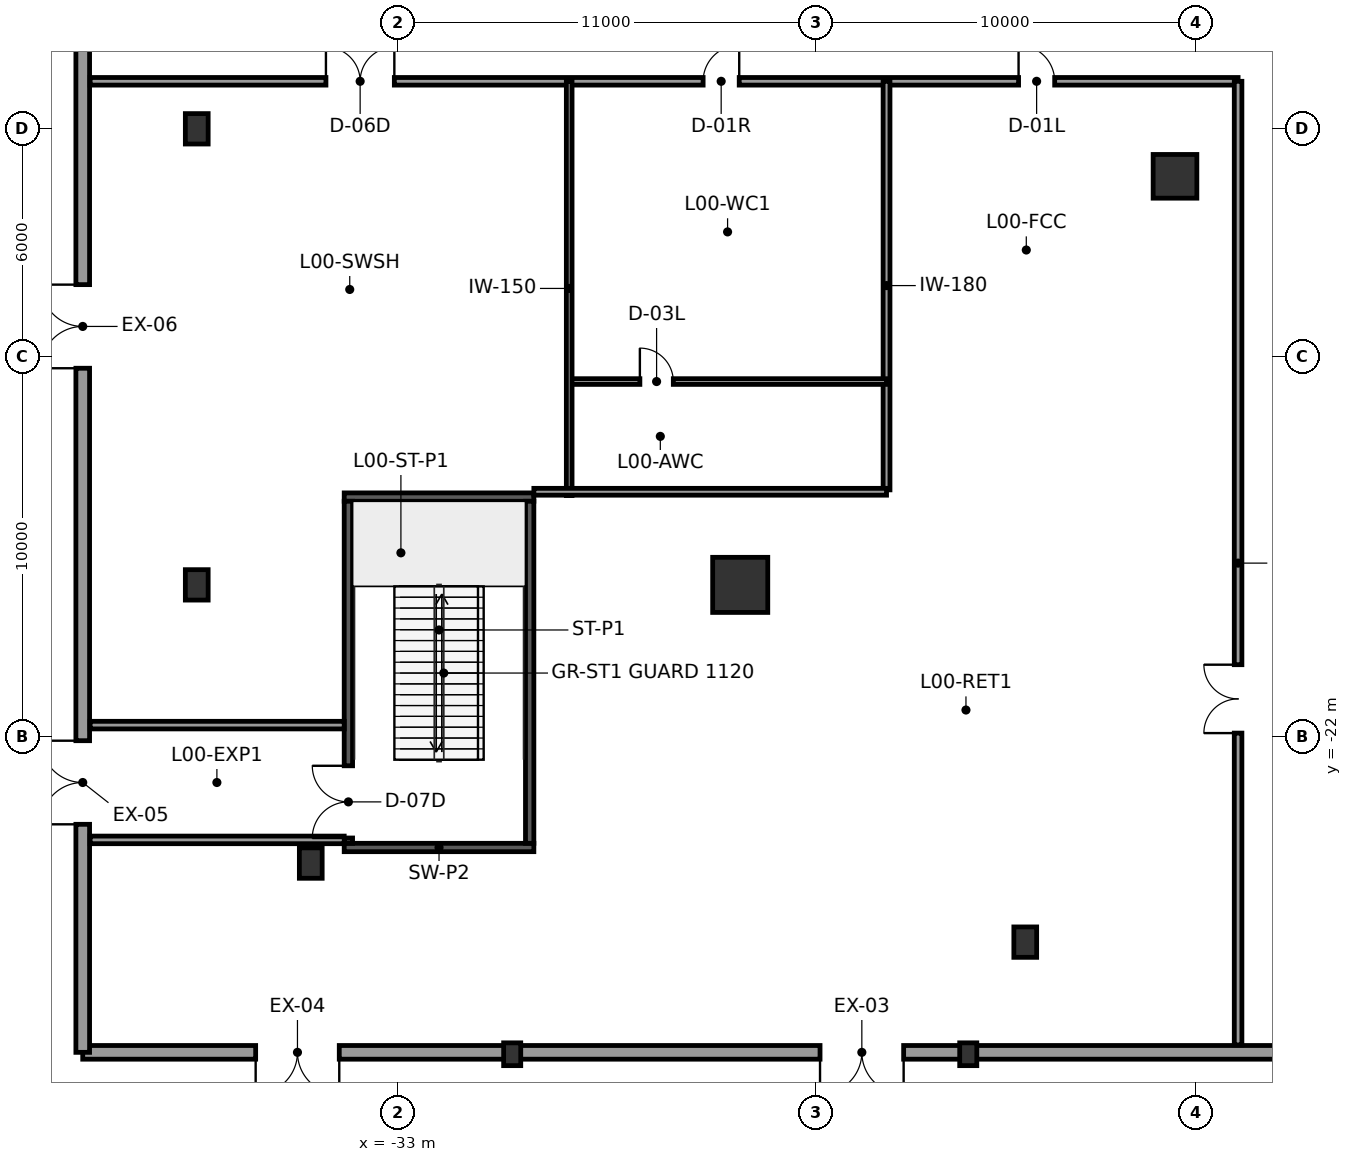
"""IFC4 building model, lengths in metres.
Left out: names, types, materials, properties, quantities, classifications, styles, units other than length and angle.
Written with IfcOpenShell. Run it as: python <this file> out.ifc"""

import sys

from ifc_helpers import new_model, si_unit, direction, frame, frame_2d, origin, origin_2d, place, context, subcontext, project, spatial, rectangle, hollow_rectangle, extrude, element, fill, save


model = new_model("IFC4")
c1 = context("Model", 3, precision=1e-05, world=origin(), true_north=direction((0.0, 1.0)))
c2 = subcontext(c1, "Body", "Model", "MODEL_VIEW")
j1 = project(units=[si_unit("LENGTHUNIT", "METRE"), si_unit("PLANEANGLEUNIT", "RADIAN")], contexts=[c1])
p1 = place(None, origin())
s1 = spatial("IfcSite", under=j1, at=p1, CompositionType="ELEMENT")
p2 = place(p1, origin())
s2 = spatial("IfcBuilding", under=s1, at=p2, CompositionType="ELEMENT")
p3 = place(p2, origin())
s3 = spatial("IfcBuildingStorey", under=s2, at=p3, CompositionType="ELEMENT", Elevation=0.0)
p4 = place(p3, frame((-12.56, -7.25, 0.0), z_axis=(0.0, 0.0, 1.0), x_axis=(1.0, 0.0, 0.0)))
e1 = element("IfcColumn", 1, at=p4, inside=s3, PredefinedType="COLUMN", context=c2, shape_type="SweptSolid", body=[
    extrude(rectangle(XDim=1.15, YDim=1.15, at=origin_2d()), origin(), (0.0, 0.0, 1.0), 6.0),
])
p5 = place(p3, frame((-24.0, -18.0, 0.0), z_axis=(0.0, 0.0, 1.0), x_axis=(1.0, 0.0, 0.0)))
e2 = element("IfcColumn", 2, at=p5, inside=s3, PredefinedType="COLUMN", context=c2, shape_type="SweptSolid", body=[
    extrude(rectangle(XDim=1.45, YDim=1.45, at=origin_2d()), origin(), (0.0, 0.0, 1.0), 6.0),
])
for number, where, z_axis, x_axis in (
    (3, (-38.3, -18.0, 0.0), (0.0, 0.0, 1.0), (1.0, 0.0, 0.0)),
    (4, (-38.3, -6.0, 0.0), (0.0, 0.0, 1.0), (1.0, 0.0, 0.0)),
    (5, (-16.5, -27.4, 0.0), (0.0, 0.0, 1.0), (1.0, 0.0, 0.0)),
    (6, (-35.3, -25.32, 0.0), (0.0, 0.0, 1.0), (1.0, 0.0, 0.0)),
):
    element("IfcColumn", number, at=place(p3, frame(where, z_axis=z_axis, x_axis=x_axis)), inside=s3, PredefinedType="COLUMN", context=c2, shape_type="SweptSolid", body=[
        extrude(hollow_rectangle(XDim=0.6, YDim=0.8, WallThickness=0.05, at=origin_2d()), origin(), (0.0, 0.0, 1.0), 6.0),
    ])
for number, where, z_axis, x_axis in (
    (7, (-30.0, -30.35, -0.3), (0.0, 0.0, 1.0), (1.0, 0.0, 0.0)),
    (8, (-18.0, -30.35, -0.3), (0.0, 0.0, 1.0), (1.0, 0.0, 0.0)),
):
    element("IfcColumn", number, at=place(p3, frame(where, z_axis=z_axis, x_axis=x_axis)), inside=s3, PredefinedType="PILASTER", context=c2, shape_type="SweptSolid", body=[
        extrude(rectangle(XDim=0.45, YDim=0.6, at=origin_2d()), origin(), (0.0, 0.0, 1.0), 6.3),
    ])
p6 = place(p3, frame((41.3, -30.3, 0.0), z_axis=(0.0, 0.0, 1.0), x_axis=(-1.0, 0.0, 0.0)))
e9 = element("IfcWall", 9, at=p6, inside=s3, PredefinedType="STANDARD", context=c2, shape_type="SweptSolid", body=[
    extrude(rectangle(XDim=82.6, YDim=0.36, at=frame_2d((41.3, 0.0))), origin(), (0.0, 0.0, 1.0), 5.7),
])
p7 = place(p6, frame((2.65, 0.0, 0.0)))
e10 = element("IfcOpeningElement", 10, at=p7, cuts=e9, PredefinedType="OPENING", context=c2, shape_type="SweptSolid", body=[
    extrude(rectangle(XDim=6.0, YDim=4.5, at=frame_2d((3.0, 2.25))), frame((0.0, 0.19, 0.0), z_axis=(0.0, -1.0, 0.0), x_axis=(1.0, 0.0, 0.0)), (0.0, 0.0, 1.0), 0.38),
])
p8 = place(p6, frame((19.4, 0.0, 0.0)))
e11 = element("IfcOpeningElement", 11, at=p8, cuts=e9, PredefinedType="OPENING", context=c2, shape_type="SweptSolid", body=[
    extrude(rectangle(XDim=2.2, YDim=2.4, at=frame_2d((1.1, 1.2))), frame((0.0, 0.19, 0.0), z_axis=(0.0, -1.0, 0.0), x_axis=(1.0, 0.0, 0.0)), (0.0, 0.0, 1.0), 0.38),
])
p9 = place(p6, frame((43.4, 0.0, 0.0)))
e12 = element("IfcOpeningElement", 12, at=p9, cuts=e9, PredefinedType="OPENING", context=c2, shape_type="SweptSolid", body=[
    extrude(rectangle(XDim=2.2, YDim=2.4, at=frame_2d((1.1, 1.2))), frame((0.0, 0.19, 0.0), z_axis=(0.0, -1.0, 0.0), x_axis=(1.0, 0.0, 0.0)), (0.0, 0.0, 1.0), 0.38),
])
p10 = place(p6, frame((61.0, 0.0, 0.0)))
e13 = element("IfcOpeningElement", 13, at=p10, cuts=e9, PredefinedType="OPENING", context=c2, shape_type="SweptSolid", body=[
    extrude(rectangle(XDim=2.2, YDim=2.4, at=frame_2d((1.1, 1.2))), frame((0.0, 0.19, 0.0), z_axis=(0.0, -1.0, 0.0), x_axis=(1.0, 0.0, 0.0)), (0.0, 0.0, 1.0), 0.38),
])
p11 = place(p6, frame((75.85, 0.0, 0.0)))
e14 = element("IfcOpeningElement", 14, at=p11, cuts=e9, PredefinedType="OPENING", context=c2, shape_type="SweptSolid", body=[
    extrude(rectangle(XDim=2.2, YDim=2.4, at=frame_2d((1.1, 1.2))), frame((0.0, 0.19, 0.0), z_axis=(0.0, -1.0, 0.0), x_axis=(1.0, 0.0, 0.0)), (0.0, 0.0, 1.0), 0.38),
])
p12 = place(p3, frame((-41.3, -30.3, 0.0), z_axis=(0.0, 0.0, 1.0), x_axis=(0.0, 1.0, 0.0)))
e15 = element("IfcWall", 15, at=p12, inside=s3, PredefinedType="STANDARD", context=c2, shape_type="SweptSolid", body=[
    extrude(rectangle(XDim=60.6, YDim=0.36, at=frame_2d((30.3, 0.0))), origin(), (0.0, 0.0, 1.0), 5.7),
])
p13 = place(p12, frame((6.0, 0.0, 0.0)))
e16 = element("IfcOpeningElement", 16, at=p13, cuts=e15, PredefinedType="OPENING", context=c2, shape_type="SweptSolid", body=[
    extrude(rectangle(XDim=2.2, YDim=2.4, at=frame_2d((1.1, 1.2))), frame((0.0, 0.19, 0.0), z_axis=(0.0, -1.0, 0.0), x_axis=(1.0, 0.0, 0.0)), (0.0, 0.0, 1.0), 0.38),
])
p14 = place(p12, frame((18.0, 0.0, 0.0)))
e17 = element("IfcOpeningElement", 17, at=p14, cuts=e15, PredefinedType="OPENING", context=c2, shape_type="SweptSolid", body=[
    extrude(rectangle(XDim=2.2, YDim=2.4, at=frame_2d((1.1, 1.2))), frame((0.0, 0.19, 0.0), z_axis=(0.0, -1.0, 0.0), x_axis=(1.0, 0.0, 0.0)), (0.0, 0.0, 1.0), 0.38),
])
p15 = place(p12, frame((41.2, 0.0, 0.0)))
e18 = element("IfcOpeningElement", 18, at=p15, cuts=e15, PredefinedType="OPENING", context=c2, shape_type="SweptSolid", body=[
    extrude(rectangle(XDim=2.2, YDim=2.4, at=frame_2d((1.1, 1.2))), frame((0.0, 0.19, 0.0), z_axis=(0.0, -1.0, 0.0), x_axis=(1.0, 0.0, 0.0)), (0.0, 0.0, 1.0), 0.38),
])
p16 = place(p12, frame((52.4, 0.0, 0.0)))
e19 = element("IfcOpeningElement", 19, at=p16, cuts=e15, PredefinedType="OPENING", context=c2, shape_type="SweptSolid", body=[
    extrude(rectangle(XDim=2.2, YDim=2.4, at=frame_2d((1.1, 1.2))), frame((0.0, 0.19, 0.0), z_axis=(0.0, -1.0, 0.0), x_axis=(1.0, 0.0, 0.0)), (0.0, 0.0, 1.0), 0.38),
])
for number, where, z_axis, x_axis in (
    (20, (-34.42, -24.91, 0.0), (0.0, 0.0, 1.0), (1.0, 0.0, 0.0)),
    (21, (-34.42, -15.69, 0.0), (0.0, 0.0, 1.0), (1.0, 0.0, 0.0)),
):
    element("IfcWall", number, at=place(p3, frame(where, z_axis=z_axis, x_axis=x_axis)), inside=s3, PredefinedType="SHEAR", context=c2, shape_type="SweptSolid", body=[
        extrude(rectangle(XDim=4.99, YDim=0.22, at=frame_2d((2.495, 0.0))), origin(), (0.0, 0.0, 1.0), 5.7),
    ])
p17 = place(p3, frame((-34.31, -24.8, 0.0), z_axis=(0.0, 0.0, 1.0), x_axis=(0.0, 1.0, 0.0)))
e22 = element("IfcWall", 22, at=p17, inside=s3, PredefinedType="SHEAR", context=c2, shape_type="SweptSolid", body=[
    extrude(rectangle(XDim=9.0, YDim=0.22, at=frame_2d((4.5, 0.0))), origin(), (0.0, 0.0, 1.0), 5.7),
])
p18 = place(p17, frame((0.14, 0.0, 0.0)))
e23 = element("IfcOpeningElement", 23, at=p18, cuts=e22, PredefinedType="OPENING", context=c2, shape_type="SweptSolid", body=[
    extrude(rectangle(XDim=1.9, YDim=2.2, at=frame_2d((0.95, 1.1))), frame((0.0, 0.12, 0.0), z_axis=(0.0, -1.0, 0.0), x_axis=(1.0, 0.0, 0.0)), (0.0, 0.0, 1.0), 0.24),
])
p19 = place(p3, frame((-29.54, -15.8, 0.0), z_axis=(0.0, 0.0, 1.0), x_axis=(0.0, -1.0, 0.0)))
e24 = element("IfcWall", 24, at=p19, inside=s3, PredefinedType="SHEAR", context=c2, shape_type="SweptSolid", body=[
    extrude(rectangle(XDim=9.0, YDim=0.22, at=frame_2d((4.5, 0.0))), origin(), (0.0, 0.0, 1.0), 5.7),
])
p20 = place(p3, frame((-41.105, -4.75, 0.0), z_axis=(0.0, 0.0, 1.0), x_axis=(1.0, 0.0, 0.0)))
e25 = element("IfcWall", 25, at=p20, inside=s3, PredefinedType="PARTITIONING", context=c2, shape_type="SweptSolid", body=[
    extrude(rectangle(XDim=30.205, YDim=0.2, at=frame_2d((15.103, 0.0))), origin(), (0.0, 0.0, 1.0), 5.7),
])
p21 = place(p20, frame((24.429, 0.0, 0.0)))
e26 = element("IfcOpeningElement", 26, at=p21, cuts=e25, PredefinedType="OPENING", context=c2, shape_type="SweptSolid", body=[
    extrude(rectangle(XDim=0.95, YDim=2.15, at=frame_2d((0.475, 1.075))), frame((0.0, 0.11, 0.0), z_axis=(0.0, -1.0, 0.0), x_axis=(1.0, 0.0, 0.0)), (0.0, 0.0, 1.0), 0.22),
])
p22 = place(p20, frame((16.129, 0.0, 0.0)))
e27 = element("IfcOpeningElement", 27, at=p22, cuts=e25, PredefinedType="OPENING", context=c2, shape_type="SweptSolid", body=[
    extrude(rectangle(XDim=0.95, YDim=2.15, at=frame_2d((0.475, 1.075))), frame((0.0, 0.11, 0.0), z_axis=(0.0, -1.0, 0.0), x_axis=(1.0, 0.0, 0.0)), (0.0, 0.0, 1.0), 0.22),
])
p23 = place(p20, frame((6.204, 0.0, 0.0)))
e28 = element("IfcOpeningElement", 28, at=p23, cuts=e25, PredefinedType="OPENING", context=c2, shape_type="SweptSolid", body=[
    extrude(rectangle(XDim=1.8, YDim=2.2, at=frame_2d((0.9, 1.1))), frame((0.0, 0.11, 0.0), z_axis=(0.0, -1.0, 0.0), x_axis=(1.0, 0.0, 0.0)), (0.0, 0.0, 1.0), 0.22),
])
p24 = place(p3, frame((-10.9, -30.105, 0.0), z_axis=(0.0, 0.0, 1.0), x_axis=(0.0, 1.0, 0.0)))
e29 = element("IfcWall", 29, at=p24, inside=s3, PredefinedType="PARTITIONING", context=c2, shape_type="SweptSolid", body=[
    extrude(rectangle(XDim=25.355, YDim=0.2, at=frame_2d((12.677, 0.0))), origin(), (0.0, 0.0, 1.0), 5.7),
])
p25 = place(p24, frame((8.205, 0.0, 0.0)))
e30 = element("IfcOpeningElement", 30, at=p25, cuts=e29, PredefinedType="OPENING", context=c2, shape_type="SweptSolid", body=[
    extrude(rectangle(XDim=1.8, YDim=2.2, at=frame_2d((0.9, 1.1))), frame((0.0, 0.11, 0.0), z_axis=(0.0, -1.0, 0.0), x_axis=(1.0, 0.0, 0.0)), (0.0, 0.0, 1.0), 0.22),
])
p26 = place(p3, frame((-20.15, -15.5, 0.0), z_axis=(0.0, 0.0, 1.0), x_axis=(0.0, 1.0, 0.0)))
e31 = element("IfcWall", 31, at=p26, inside=s3, PredefinedType="PARTITIONING", context=c2, shape_type="SweptSolid", body=[
    extrude(rectangle(XDim=10.75, YDim=0.18, at=frame_2d((5.375, 0.0))), origin(), (0.0, 0.0, 1.0), 5.7),
])
p27 = place(p3, frame((-28.5, -12.65, 0.0), z_axis=(0.0, 0.0, 1.0), x_axis=(1.0, 0.0, 0.0)))
e32 = element("IfcWall", 32, at=p27, inside=s3, PredefinedType="PARTITIONING", context=c2, shape_type="SweptSolid", body=[
    extrude(rectangle(XDim=8.35, YDim=0.15, at=frame_2d((4.175, 0.0))), origin(), (0.0, 0.0, 1.0), 5.7),
])
p28 = place(p27, frame((1.86, 0.0, 0.0)))
e33 = element("IfcOpeningElement", 33, at=p28, cuts=e32, PredefinedType="OPENING", context=c2, shape_type="SweptSolid", body=[
    extrude(rectangle(XDim=0.88, YDim=2.1, at=frame_2d((0.44, 1.05))), frame((0.0, 0.085, 0.0), z_axis=(0.0, -1.0, 0.0), x_axis=(1.0, 0.0, 0.0)), (0.0, 0.0, 1.0), 0.17),
])
p29 = place(p3, frame((-28.5, -15.65, 0.0), z_axis=(0.0, 0.0, 1.0), x_axis=(0.0, 1.0, 0.0)))
e34 = element("IfcWall", 34, at=p29, inside=s3, PredefinedType="PARTITIONING", context=c2, shape_type="SweptSolid", body=[
    extrude(rectangle(XDim=10.9, YDim=0.15, at=frame_2d((5.45, 0.0))), origin(), (0.0, 0.0, 1.0), 5.7),
])
p30 = place(p3, frame((-29.43, -15.55, 0.0), z_axis=(0.0, 0.0, 1.0), x_axis=(1.0, 0.0, 0.0)))
e35 = element("IfcWall", 35, at=p30, inside=s3, PredefinedType="PARTITIONING", context=c2, shape_type="SweptSolid", body=[
    extrude(rectangle(XDim=9.28, YDim=0.18, at=frame_2d((4.64, 0.0))), origin(), (0.0, 0.0, 1.0), 5.7),
])
for number, where, z_axis, x_axis in (
    (36, (-41.105, -24.71, 0.0), (0.0, 0.0, 1.0), (1.0, 0.0, 0.0)),
    (37, (-41.105, -21.69, 0.0), (0.0, 0.0, 1.0), (1.0, 0.0, 0.0)),
):
    element("IfcWall", number, at=place(p3, frame(where, z_axis=z_axis, x_axis=x_axis)), inside=s3, PredefinedType="PARTITIONING", context=c2, shape_type="SweptSolid", body=[
        extrude(rectangle(XDim=6.685, YDim=0.2, at=frame_2d((3.343, 0.0))), origin(), (0.0, 0.0, 1.0), 5.7),
    ])
p31 = place(p10, origin())
e38 = element("IfcDoor", 38, at=p31, inside=s3, OperationType="DOUBLE_DOOR_SINGLE_SWING", PredefinedType="DOOR", context=c2, shape_type="SweptSolid", body=[
    extrude(rectangle(XDim=2.2, YDim=2.4, at=frame_2d((1.1, 1.2))), frame((0.0, 0.025, 0.0), z_axis=(0.0, -1.0, 0.0), x_axis=(1.0, 0.0, 0.0)), (0.0, 0.0, 1.0), 0.05),
])
fill(e13, e38)
p32 = place(p11, origin())
e39 = element("IfcDoor", 39, at=p32, inside=s3, OperationType="DOUBLE_DOOR_SINGLE_SWING", PredefinedType="DOOR", context=c2, shape_type="SweptSolid", body=[
    extrude(rectangle(XDim=2.2, YDim=2.4, at=frame_2d((1.1, 1.2))), frame((0.0, 0.025, 0.0), z_axis=(0.0, -1.0, 0.0), x_axis=(1.0, 0.0, 0.0)), (0.0, 0.0, 1.0), 0.05),
])
fill(e14, e39)
p33 = place(p13, origin())
e40 = element("IfcDoor", 40, at=p33, inside=s3, OperationType="DOUBLE_DOOR_SINGLE_SWING", PredefinedType="DOOR", context=c2, shape_type="SweptSolid", body=[
    extrude(rectangle(XDim=2.2, YDim=2.4, at=frame_2d((1.1, 1.2))), frame((0.0, 0.025, 0.0), z_axis=(0.0, -1.0, 0.0), x_axis=(1.0, 0.0, 0.0)), (0.0, 0.0, 1.0), 0.05),
])
fill(e16, e40)
p34 = place(p14, origin())
e41 = element("IfcDoor", 41, at=p34, inside=s3, OperationType="DOUBLE_DOOR_SINGLE_SWING", PredefinedType="DOOR", context=c2, shape_type="SweptSolid", body=[
    extrude(rectangle(XDim=2.2, YDim=2.4, at=frame_2d((1.1, 1.2))), frame((0.0, 0.025, 0.0), z_axis=(0.0, -1.0, 0.0), x_axis=(1.0, 0.0, 0.0)), (0.0, 0.0, 1.0), 0.05),
])
fill(e17, e41)
p35 = place(p18, origin())
e42 = element("IfcDoor", 42, at=p35, inside=s3, OperationType="DOUBLE_DOOR_SINGLE_SWING", PredefinedType="DOOR", context=c2, shape_type="SweptSolid", body=[
    extrude(rectangle(XDim=1.9, YDim=2.2, at=frame_2d((0.95, 1.1))), frame((0.0, 0.025, 0.0), z_axis=(0.0, -1.0, 0.0), x_axis=(1.0, 0.0, 0.0)), (0.0, 0.0, 1.0), 0.05),
])
fill(e23, e42)
p36 = place(p21, origin())
e43 = element("IfcDoor", 43, at=p36, inside=s3, OperationType="SINGLE_SWING_LEFT", PredefinedType="DOOR", context=c2, shape_type="SweptSolid", body=[
    extrude(rectangle(XDim=0.95, YDim=2.15, at=frame_2d((0.475, 1.075))), frame((0.0, 0.025, 0.0), z_axis=(0.0, -1.0, 0.0), x_axis=(1.0, 0.0, 0.0)), (0.0, 0.0, 1.0), 0.05),
])
fill(e26, e43)
p37 = place(p22, origin())
e44 = element("IfcDoor", 44, at=p37, inside=s3, OperationType="SINGLE_SWING_RIGHT", PredefinedType="DOOR", context=c2, shape_type="SweptSolid", body=[
    extrude(rectangle(XDim=0.95, YDim=2.15, at=frame_2d((0.475, 1.075))), frame((0.0, 0.025, 0.0), z_axis=(0.0, -1.0, 0.0), x_axis=(1.0, 0.0, 0.0)), (0.0, 0.0, 1.0), 0.05),
])
fill(e27, e44)
p38 = place(p23, origin())
e45 = element("IfcDoor", 45, at=p38, inside=s3, OperationType="DOUBLE_DOOR_SINGLE_SWING", PredefinedType="DOOR", context=c2, shape_type="SweptSolid", body=[
    extrude(rectangle(XDim=1.8, YDim=2.2, at=frame_2d((0.9, 1.1))), frame((0.0, 0.025, 0.0), z_axis=(0.0, -1.0, 0.0), x_axis=(1.0, 0.0, 0.0)), (0.0, 0.0, 1.0), 0.05),
])
fill(e28, e45)
p39 = place(p25, origin())
e46 = element("IfcDoor", 46, at=p39, inside=s3, OperationType="DOUBLE_DOOR_SINGLE_SWING", PredefinedType="DOOR", context=c2, shape_type="SweptSolid", body=[
    extrude(rectangle(XDim=1.8, YDim=2.2, at=frame_2d((0.9, 1.1))), frame((0.0, 0.025, 0.0), z_axis=(0.0, -1.0, 0.0), x_axis=(1.0, 0.0, 0.0)), (0.0, 0.0, 1.0), 0.05),
])
fill(e30, e46)
p40 = place(p28, origin())
e47 = element("IfcDoor", 47, at=p40, inside=s3, OperationType="SINGLE_SWING_LEFT", PredefinedType="DOOR", context=c2, shape_type="SweptSolid", body=[
    extrude(rectangle(XDim=0.88, YDim=2.1, at=frame_2d((0.44, 1.05))), frame((0.0, 0.025, 0.0), z_axis=(0.0, -1.0, 0.0), x_axis=(1.0, 0.0, 0.0)), (0.0, 0.0, 1.0), 0.05),
])
fill(e33, e47)
save(model, sys.argv[1])
